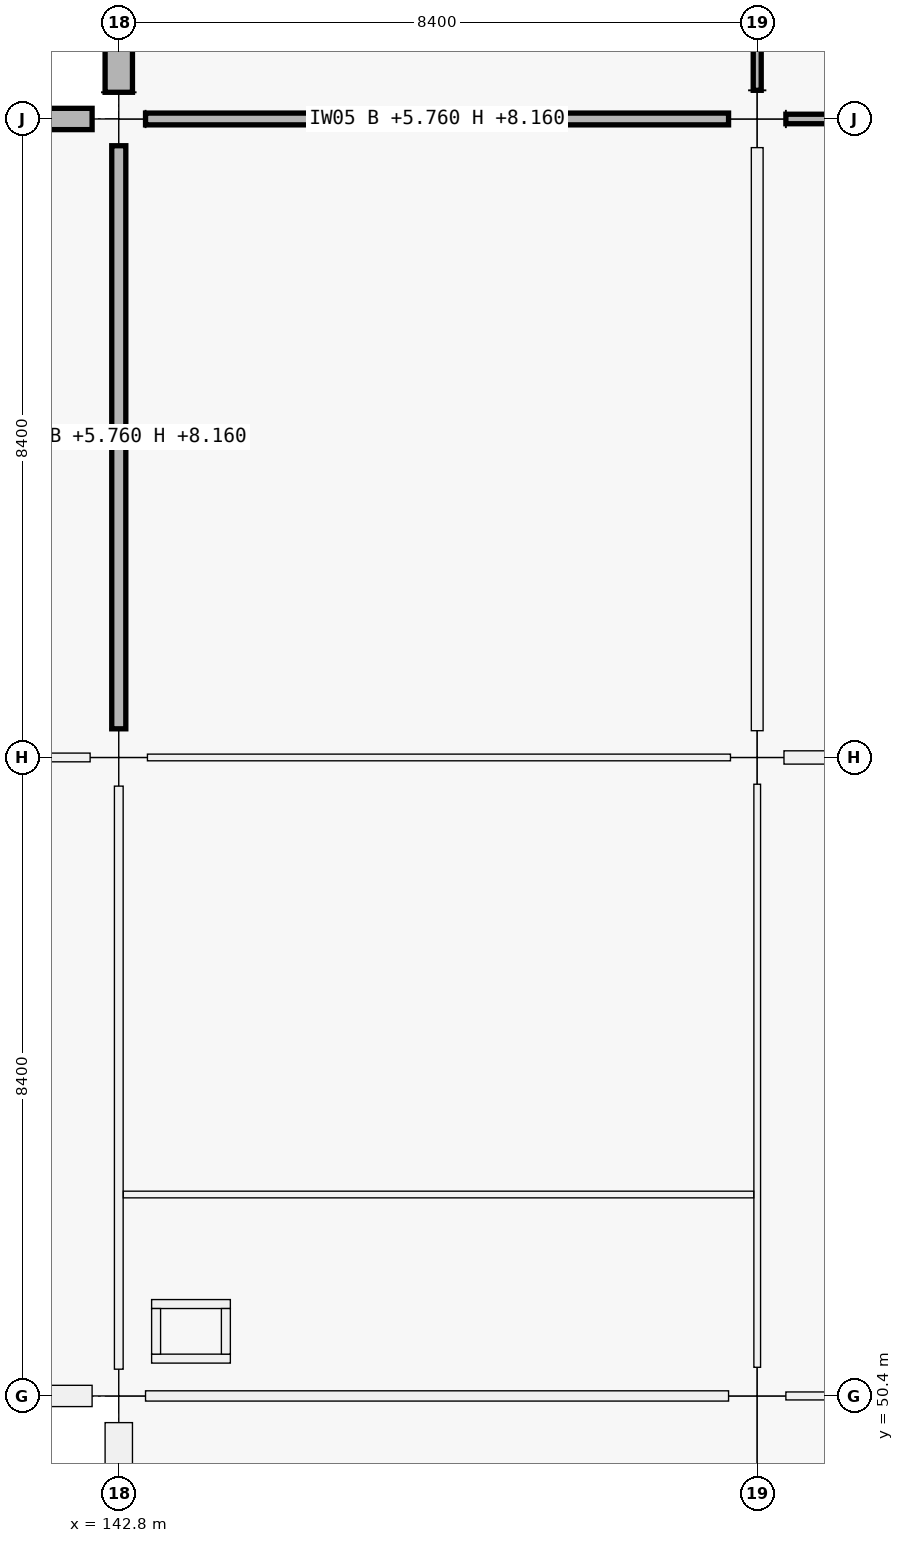
"""IFC4 building model, lengths in metres.
Left out: names, types, materials, properties, quantities, classifications, styles, units other than length and angle.
Written with IfcOpenShell. Run it as: python <this file> out.ifc"""

import sys

from ifc_helpers import new_model, si_unit, direction, frame, frame_2d, origin, origin_2d, place, context, subcontext, project, spatial, rectangle, extrude, element, fill, save


model = new_model("IFC4")
c1 = context("Model", 3, precision=1e-05, world=origin(), true_north=direction((0.0, 1.0)))
c2 = subcontext(c1, "Body", "Model", "MODEL_VIEW")
j1 = project(units=[si_unit("LENGTHUNIT", "METRE"), si_unit("PLANEANGLEUNIT", "RADIAN")], contexts=[c1])
p1 = place(None, origin())
s1 = spatial("IfcSite", under=j1, at=p1, CompositionType="ELEMENT")
p2 = place(p1, origin())
s2 = spatial("IfcBuilding", under=s1, at=p2, CompositionType="ELEMENT")
p3 = place(p2, frame((0.0, 0.0, 5.76)))
s3 = spatial("IfcBuildingStorey", under=s2, at=p3, CompositionType="ELEMENT", Elevation=5.76)
p4 = place(p3, frame((142.8, 50.4, 0.0), z_axis=(0.0, 0.0, 1.0), x_axis=(1.0, 0.0, 0.0)))
e1 = element("IfcColumn", 1, at=p4, inside=s3, PredefinedType="COLUMN", context=c2, shape_type="SweptSolid", body=[
    extrude(rectangle(XDim=0.7, YDim=0.7, at=origin_2d()), origin(), (0.0, 0.0, 1.0), 4.5),
])
p5 = place(p3, frame((142.8, 58.8, 0.0), z_axis=(0.0, 0.0, 1.0), x_axis=(1.0, 0.0, 0.0)))
e2 = element("IfcColumn", 2, at=p5, inside=s3, PredefinedType="COLUMN", context=c2, shape_type="SweptSolid", body=[
    extrude(rectangle(XDim=0.75, YDim=0.75, at=origin_2d()), origin(), (0.0, 0.0, 1.0), 4.5),
])
p6 = place(p3, frame((142.8, 67.2, 0.0), z_axis=(0.0, 0.0, 1.0), x_axis=(1.0, 0.0, 0.0)))
e3 = element("IfcColumn", 3, at=p6, inside=s3, PredefinedType="COLUMN", context=c2, shape_type="SweptSolid", body=[
    extrude(rectangle(XDim=0.7, YDim=0.7, at=origin_2d()), origin(), (0.0, 0.0, 1.0), 4.5),
])
p7 = place(p3, frame((151.2, 50.4, 0.0), z_axis=(0.0, 0.0, 1.0), x_axis=(1.0, 0.0, 0.0)))
e4 = element("IfcColumn", 4, at=p7, inside=s3, PredefinedType="COLUMN", context=c2, shape_type="SweptSolid", body=[
    extrude(rectangle(XDim=0.75, YDim=0.75, at=origin_2d()), origin(), (0.0, 0.0, 1.0), 4.5),
])
p8 = place(p3, frame((151.2, 58.8, 0.0), z_axis=(0.0, 0.0, 1.0), x_axis=(1.0, 0.0, 0.0)))
e5 = element("IfcColumn", 5, at=p8, inside=s3, PredefinedType="COLUMN", context=c2, shape_type="SweptSolid", body=[
    extrude(rectangle(XDim=0.7, YDim=0.7, at=origin_2d()), origin(), (0.0, 0.0, 1.0), 4.5),
])
p9 = place(p3, frame((151.2, 67.2, 0.0), z_axis=(0.0, 0.0, 1.0), x_axis=(1.0, 0.0, 0.0)))
e6 = element("IfcColumn", 6, at=p9, inside=s3, PredefinedType="COLUMN", context=c2, shape_type="SweptSolid", body=[
    extrude(rectangle(XDim=0.75, YDim=0.75, at=origin_2d()), origin(), (0.0, 0.0, 1.0), 4.5),
])
p10 = place(p3, frame((142.449, 50.4, 0.0), z_axis=(0.0, 0.0, 1.0), x_axis=(-1.0, 0.0, 0.0)))
e7 = element("IfcWall", 7, at=p10, inside=s3, PredefinedType="SOLIDWALL", context=c2, shape_type="SweptSolid", body=[
    extrude(rectangle(XDim=7.673, YDim=0.28, at=frame_2d((3.836, 0.0))), origin(), (0.0, 0.0, 1.0), 3.4),
])
p11 = place(p3, frame((134.726, 67.2, 0.0), z_axis=(0.0, 0.0, 1.0), x_axis=(1.0, 0.0, 0.0)))
e8 = element("IfcWall", 8, at=p11, inside=s3, PredefinedType="SOLIDWALL", context=c2, shape_type="SweptSolid", body=[
    extrude(rectangle(XDim=7.723, YDim=0.28, at=frame_2d((3.861, 0.0))), origin(), (0.0, 0.0, 1.0), 3.4),
])
p12 = place(p11, frame((2.662, 0.0, 0.9)))
e9 = element("IfcOpeningElement", 9, at=p12, cuts=e8, PredefinedType="OPENING", context=c2, shape_type="SweptSolid", body=[
    extrude(rectangle(XDim=2.4, YDim=2.25, at=frame_2d((1.2, 1.125))), frame((0.0, 0.14, 0.0), z_axis=(0.0, -1.0, 0.0), x_axis=(1.0, 0.0, 0.0)), (0.0, 0.0, 1.0), 0.28),
])
p13 = place(p3, frame((142.8, 42.376, 0.0), z_axis=(0.0, 0.0, 1.0), x_axis=(0.0, 1.0, 0.0)))
e10 = element("IfcWall", 10, at=p13, inside=s3, PredefinedType="SOLIDWALL", context=c2, shape_type="SweptSolid", body=[
    extrude(rectangle(XDim=7.673, YDim=0.36, at=frame_2d((3.836, 0.0))), origin(), (0.0, 0.0, 1.0), 3.4),
])
p14 = place(p13, frame((3.386, 0.0, 0.9)))
e11 = element("IfcOpeningElement", 11, at=p14, cuts=e10, PredefinedType="OPENING", context=c2, shape_type="SweptSolid", body=[
    extrude(rectangle(XDim=0.9, YDim=1.5, at=frame_2d((0.45, 0.75))), frame((0.0, 0.18, 0.0), z_axis=(0.0, -1.0, 0.0), x_axis=(1.0, 0.0, 0.0)), (0.0, 0.0, 1.0), 0.36),
])
p15 = place(p3, frame((142.8, 67.551, 0.0), z_axis=(0.0, 0.0, 1.0), x_axis=(0.0, 1.0, 0.0)))
e12 = element("IfcWall", 12, at=p15, inside=s3, PredefinedType="SOLIDWALL", context=c2, shape_type="SweptSolid", body=[
    extrude(rectangle(XDim=7.773, YDim=0.36, at=frame_2d((3.886, 0.0))), origin(), (0.0, 0.0, 1.0), 3.4),
])
p16 = place(p15, frame((3.036, 0.0, 0.9)))
e13 = element("IfcOpeningElement", 13, at=p16, cuts=e12, PredefinedType="OPENING", context=c2, shape_type="SweptSolid", body=[
    extrude(rectangle(XDim=1.7, YDim=1.85, at=frame_2d((0.85, 0.925))), frame((0.0, 0.18, 0.0), z_axis=(0.0, -1.0, 0.0), x_axis=(1.0, 0.0, 0.0)), (0.0, 0.0, 1.0), 0.36),
])
for number, where, z_axis, x_axis in (
    (14, (143.232, 50.891, 0.0), (0.0, 0.0, 1.0), (1.0, 0.0, 0.0)),
    (15, (143.232, 51.609, 0.0), (0.0, 0.0, 1.0), (1.0, 0.0, 0.0)),
):
    element("IfcWall", number, at=place(p3, frame(where, z_axis=z_axis, x_axis=x_axis)), inside=s3, PredefinedType="PARTITIONING", context=c2, shape_type="SweptSolid", body=[
        extrude(rectangle(XDim=1.036, YDim=0.118, at=frame_2d((0.518, 0.0))), origin(), (0.0, 0.0, 1.0), 3.48),
    ])
for number, where, z_axis, x_axis in (
    (16, (143.291, 50.95, 0.0), (0.0, 0.0, 1.0), (0.0, 1.0, 0.0)),
    (17, (144.209, 50.95, 0.0), (0.0, 0.0, 1.0), (0.0, 1.0, 0.0)),
):
    element("IfcWall", number, at=place(p3, frame(where, z_axis=z_axis, x_axis=x_axis)), inside=s3, PredefinedType="PARTITIONING", context=c2, shape_type="SweptSolid", body=[
        extrude(rectangle(XDim=0.6, YDim=0.118, at=frame_2d((0.3, 0.0))), origin(), (0.0, 0.0, 1.0), 3.48),
    ])
p17 = place(p3, frame((134.752, 58.8, 0.0), z_axis=(0.0, 0.0, 1.0), x_axis=(1.0, 0.0, 0.0)))
e18 = element("IfcWall", 18, at=p17, inside=s3, PredefinedType="PARTITIONING", context=c2, shape_type="SweptSolid", body=[
    extrude(rectangle(XDim=7.671, YDim=0.115, at=frame_2d((3.835, 0.0))), origin(), (0.0, 0.0, 1.0), 2.4),
])
p18 = place(p17, frame((3.356, 0.0, 0.0)))
e19 = element("IfcOpeningElement", 19, at=p18, cuts=e18, PredefinedType="OPENING", context=c2, shape_type="SweptSolid", body=[
    extrude(rectangle(XDim=0.96, YDim=2.18, at=frame_2d((0.48, 1.09))), frame((0.0, 0.058, 0.0), z_axis=(0.0, -1.0, 0.0), x_axis=(1.0, 0.0, 0.0)), (0.0, 0.0, 1.0), 0.115),
])
p19 = place(p3, frame((143.152, 50.4, 0.0), z_axis=(0.0, 0.0, 1.0), x_axis=(1.0, 0.0, 0.0)))
e20 = element("IfcWall", 20, at=p19, inside=s3, PredefinedType="PARTITIONING", context=c2, shape_type="SweptSolid", body=[
    extrude(rectangle(XDim=7.671, YDim=0.135, at=frame_2d((3.835, 0.0))), origin(), (0.0, 0.0, 1.0), 2.4),
])
p20 = place(p3, frame((143.177, 58.8, 0.0), z_axis=(0.0, 0.0, 1.0), x_axis=(1.0, 0.0, 0.0)))
e21 = element("IfcWall", 21, at=p20, inside=s3, PredefinedType="PARTITIONING", context=c2, shape_type="SweptSolid", body=[
    extrude(rectangle(XDim=7.671, YDim=0.088, at=frame_2d((3.835, 0.0))), origin(), (0.0, 0.0, 1.0), 2.4),
])
p21 = place(p3, frame((143.152, 67.2, 0.0), z_axis=(0.0, 0.0, 1.0), x_axis=(1.0, 0.0, 0.0)))
e22 = element("IfcWall", 22, at=p21, inside=s3, PredefinedType="PARTITIONING", context=c2, shape_type="SweptSolid", body=[
    extrude(rectangle(XDim=7.671, YDim=0.155, at=frame_2d((3.835, 0.0))), origin(), (0.0, 0.0, 1.0), 2.4),
])
p22 = place(p21, frame((3.336, 0.0, 0.0)))
e23 = element("IfcOpeningElement", 23, at=p22, cuts=e22, PredefinedType="OPENING", context=c2, shape_type="SweptSolid", body=[
    extrude(rectangle(XDim=1.0, YDim=2.2, at=frame_2d((0.5, 1.1))), frame((0.0, 0.078, 0.0), z_axis=(0.0, -1.0, 0.0), x_axis=(1.0, 0.0, 0.0)), (0.0, 0.0, 1.0), 0.155),
])
p23 = place(p3, frame((151.577, 50.4, 0.0), z_axis=(0.0, 0.0, 1.0), x_axis=(1.0, 0.0, 0.0)))
e24 = element("IfcWall", 24, at=p23, inside=s3, PredefinedType="PARTITIONING", context=c2, shape_type="SweptSolid", body=[
    extrude(rectangle(XDim=7.671, YDim=0.105, at=frame_2d((3.835, 0.0))), origin(), (0.0, 0.0, 1.0), 2.4),
])
p24 = place(p23, frame((3.365, 0.0, 0.0)))
e25 = element("IfcOpeningElement", 25, at=p24, cuts=e24, PredefinedType="OPENING", context=c2, shape_type="SweptSolid", body=[
    extrude(rectangle(XDim=0.94, YDim=2.15, at=frame_2d((0.47, 1.075))), frame((0.0, 0.052, 0.0), z_axis=(0.0, -1.0, 0.0), x_axis=(1.0, 0.0, 0.0)), (0.0, 0.0, 1.0), 0.105),
])
p25 = place(p3, frame((151.552, 58.8, 0.0), z_axis=(0.0, 0.0, 1.0), x_axis=(1.0, 0.0, 0.0)))
e26 = element("IfcWall", 26, at=p25, inside=s3, PredefinedType="PARTITIONING", context=c2, shape_type="SweptSolid", body=[
    extrude(rectangle(XDim=7.671, YDim=0.175, at=frame_2d((3.835, 0.0))), origin(), (0.0, 0.0, 1.0), 2.4),
])
p26 = place(p25, frame((3.376, 0.0, 0.0)))
e27 = element("IfcOpeningElement", 27, at=p26, cuts=e26, PredefinedType="OPENING", context=c2, shape_type="SweptSolid", body=[
    extrude(rectangle(XDim=0.92, YDim=2.15, at=frame_2d((0.46, 1.075))), frame((0.0, 0.087, 0.0), z_axis=(0.0, -1.0, 0.0), x_axis=(1.0, 0.0, 0.0)), (0.0, 0.0, 1.0), 0.175),
])
p27 = place(p3, frame((151.577, 67.2, 0.0), z_axis=(0.0, 0.0, 1.0), x_axis=(1.0, 0.0, 0.0)))
e28 = element("IfcWall", 28, at=p27, inside=s3, PredefinedType="PARTITIONING", context=c2, shape_type="SweptSolid", body=[
    extrude(rectangle(XDim=7.671, YDim=0.125, at=frame_2d((3.835, 0.0))), origin(), (0.0, 0.0, 1.0), 2.4),
])
p28 = place(p27, frame((3.311, 0.0, 0.0)))
e29 = element("IfcOpeningElement", 29, at=p28, cuts=e28, PredefinedType="OPENING", context=c2, shape_type="SweptSolid", body=[
    extrude(rectangle(XDim=1.05, YDim=2.12, at=frame_2d((0.525, 1.06))), frame((0.0, 0.062, 0.0), z_axis=(0.0, -1.0, 0.0), x_axis=(1.0, 0.0, 0.0)), (0.0, 0.0, 1.0), 0.125),
])
p29 = place(p3, frame((142.8, 50.752, 0.0), z_axis=(0.0, 0.0, 1.0), x_axis=(0.0, 1.0, 0.0)))
e30 = element("IfcWall", 30, at=p29, inside=s3, PredefinedType="PARTITIONING", context=c2, shape_type="SweptSolid", body=[
    extrude(rectangle(XDim=7.671, YDim=0.115, at=frame_2d((3.835, 0.0))), origin(), (0.0, 0.0, 1.0), 2.4),
])
p30 = place(p29, frame((0.623, 0.0, 0.0)))
e31 = element("IfcOpeningElement", 31, at=p30, cuts=e30, PredefinedType="OPENING", context=c2, shape_type="SweptSolid", body=[
    extrude(rectangle(XDim=0.98, YDim=2.08, at=frame_2d((0.49, 1.04))), frame((0.0, 0.058, 0.0), z_axis=(0.0, -1.0, 0.0), x_axis=(1.0, 0.0, 0.0)), (0.0, 0.0, 1.0), 0.115),
])
p31 = place(p29, frame((4.563, 0.0, 0.0)))
e32 = element("IfcOpeningElement", 32, at=p31, cuts=e30, PredefinedType="OPENING", context=c2, shape_type="SweptSolid", body=[
    extrude(rectangle(XDim=0.94, YDim=2.08, at=frame_2d((0.47, 1.04))), frame((0.0, 0.058, 0.0), z_axis=(0.0, -1.0, 0.0), x_axis=(1.0, 0.0, 0.0)), (0.0, 0.0, 1.0), 0.115),
])
p32 = place(p3, frame((142.8, 59.177, 0.0), z_axis=(0.0, 0.0, 1.0), x_axis=(0.0, 1.0, 0.0)))
e33 = element("IfcWall", 33, at=p32, inside=s3, PredefinedType="PARTITIONING", context=c2, shape_type="SweptSolid", body=[
    extrude(rectangle(XDim=7.671, YDim=0.185, at=frame_2d((3.835, 0.0))), origin(), (0.0, 0.0, 1.0), 2.4),
])
p33 = place(p32, frame((3.376, 0.0, 0.0)))
e34 = element("IfcOpeningElement", 34, at=p33, cuts=e33, PredefinedType="OPENING", context=c2, shape_type="SweptSolid", body=[
    extrude(rectangle(XDim=0.92, YDim=2.15, at=frame_2d((0.46, 1.075))), frame((0.0, 0.093, 0.0), z_axis=(0.0, -1.0, 0.0), x_axis=(1.0, 0.0, 0.0)), (0.0, 0.0, 1.0), 0.185),
])
p34 = place(p3, frame((151.2, 50.777, 0.0), z_axis=(0.0, 0.0, 1.0), x_axis=(0.0, 1.0, 0.0)))
e35 = element("IfcWall", 35, at=p34, inside=s3, PredefinedType="PARTITIONING", context=c2, shape_type="SweptSolid", body=[
    extrude(rectangle(XDim=7.671, YDim=0.088, at=frame_2d((3.835, 0.0))), origin(), (0.0, 0.0, 1.0), 2.4),
])
p35 = place(p3, frame((151.2, 59.152, 0.0), z_axis=(0.0, 0.0, 1.0), x_axis=(0.0, 1.0, 0.0)))
e36 = element("IfcWall", 36, at=p35, inside=s3, PredefinedType="PARTITIONING", context=c2, shape_type="SweptSolid", body=[
    extrude(rectangle(XDim=7.671, YDim=0.155, at=frame_2d((3.835, 0.0))), origin(), (0.0, 0.0, 1.0), 2.4),
])
p36 = place(p35, frame((3.331, 0.0, 0.0)))
e37 = element("IfcOpeningElement", 37, at=p36, cuts=e36, PredefinedType="OPENING", context=c2, shape_type="SweptSolid", body=[
    extrude(rectangle(XDim=1.01, YDim=2.12, at=frame_2d((0.505, 1.06))), frame((0.0, 0.078, 0.0), z_axis=(0.0, -1.0, 0.0), x_axis=(1.0, 0.0, 0.0)), (0.0, 0.0, 1.0), 0.155),
])
p37 = place(p3, frame((151.2, 67.577, 0.0), z_axis=(0.0, 0.0, 1.0), x_axis=(0.0, 1.0, 0.0)))
e38 = element("IfcWall", 38, at=p37, inside=s3, PredefinedType="PARTITIONING", context=c2, shape_type="SweptSolid", body=[
    extrude(rectangle(XDim=7.746, YDim=0.105, at=frame_2d((3.873, 0.0))), origin(), (0.0, 0.0, 1.0), 2.4),
])
p38 = place(p37, frame((3.388, 0.0, 0.0)))
e39 = element("IfcOpeningElement", 39, at=p38, cuts=e38, PredefinedType="OPENING", context=c2, shape_type="SweptSolid", body=[
    extrude(rectangle(XDim=0.97, YDim=2.12, at=frame_2d((0.485, 1.06))), frame((0.0, 0.052, 0.0), z_axis=(0.0, -1.0, 0.0), x_axis=(1.0, 0.0, 0.0)), (0.0, 0.0, 1.0), 0.105),
])
p39 = place(p3, frame((142.86, 53.05, 0.0), z_axis=(0.0, 0.0, 1.0), x_axis=(1.0, 0.0, 0.0)))
e40 = element("IfcWall", 40, at=p39, inside=s3, PredefinedType="PARTITIONING", context=c2, shape_type="SweptSolid", body=[
    extrude(rectangle(XDim=8.294, YDim=0.088, at=frame_2d((4.147, 0.0))), origin(), (0.0, 0.0, 1.0), 2.4),
])
p40 = place(p30, origin())
e41 = element("IfcDoor", 41, at=p40, inside=s3, OperationType="SINGLE_SWING_RIGHT", PredefinedType="DOOR", context=c2, shape_type="SweptSolid", body=[
    extrude(rectangle(XDim=0.98, YDim=2.08, at=frame_2d((0.49, 1.04))), frame((0.0, 0.025, 0.0), z_axis=(0.0, -1.0, 0.0), x_axis=(1.0, 0.0, 0.0)), (0.0, 0.0, 1.0), 0.05),
])
fill(e31, e41)
p41 = place(p31, origin())
e42 = element("IfcDoor", 42, at=p41, inside=s3, OperationType="SINGLE_SWING_LEFT", PredefinedType="DOOR", context=c2, shape_type="SweptSolid", body=[
    extrude(rectangle(XDim=0.94, YDim=2.08, at=frame_2d((0.47, 1.04))), frame((0.0, 0.025, 0.0), z_axis=(0.0, -1.0, 0.0), x_axis=(1.0, 0.0, 0.0)), (0.0, 0.0, 1.0), 0.05),
])
fill(e32, e42)
p42 = place(p22, origin())
e43 = element("IfcDoor", 43, at=p42, inside=s3, OperationType="SINGLE_SWING_RIGHT", PredefinedType="DOOR", context=c2, shape_type="SweptSolid", body=[
    extrude(rectangle(XDim=1.0, YDim=2.2, at=frame_2d((0.5, 1.1))), frame((0.0, 0.025, 0.0), z_axis=(0.0, -1.0, 0.0), x_axis=(1.0, 0.0, 0.0)), (0.0, 0.0, 1.0), 0.05),
])
fill(e23, e43)
p43 = place(p33, origin())
e44 = element("IfcDoor", 44, at=p43, inside=s3, OperationType="SINGLE_SWING_RIGHT", PredefinedType="DOOR", context=c2, shape_type="SweptSolid", body=[
    extrude(rectangle(XDim=0.92, YDim=2.15, at=frame_2d((0.46, 1.075))), frame((0.0, 0.025, 0.0), z_axis=(0.0, -1.0, 0.0), x_axis=(1.0, 0.0, 0.0)), (0.0, 0.0, 1.0), 0.05),
])
fill(e34, e44)
p44 = place(p36, origin())
e45 = element("IfcDoor", 45, at=p44, inside=s3, OperationType="SINGLE_SWING_RIGHT", PredefinedType="DOOR", context=c2, shape_type="SweptSolid", body=[
    extrude(rectangle(XDim=1.01, YDim=2.12, at=frame_2d((0.505, 1.06))), frame((0.0, 0.025, 0.0), z_axis=(0.0, -1.0, 0.0), x_axis=(1.0, 0.0, 0.0)), (0.0, 0.0, 1.0), 0.05),
])
fill(e37, e45)
save(model, sys.argv[1])
